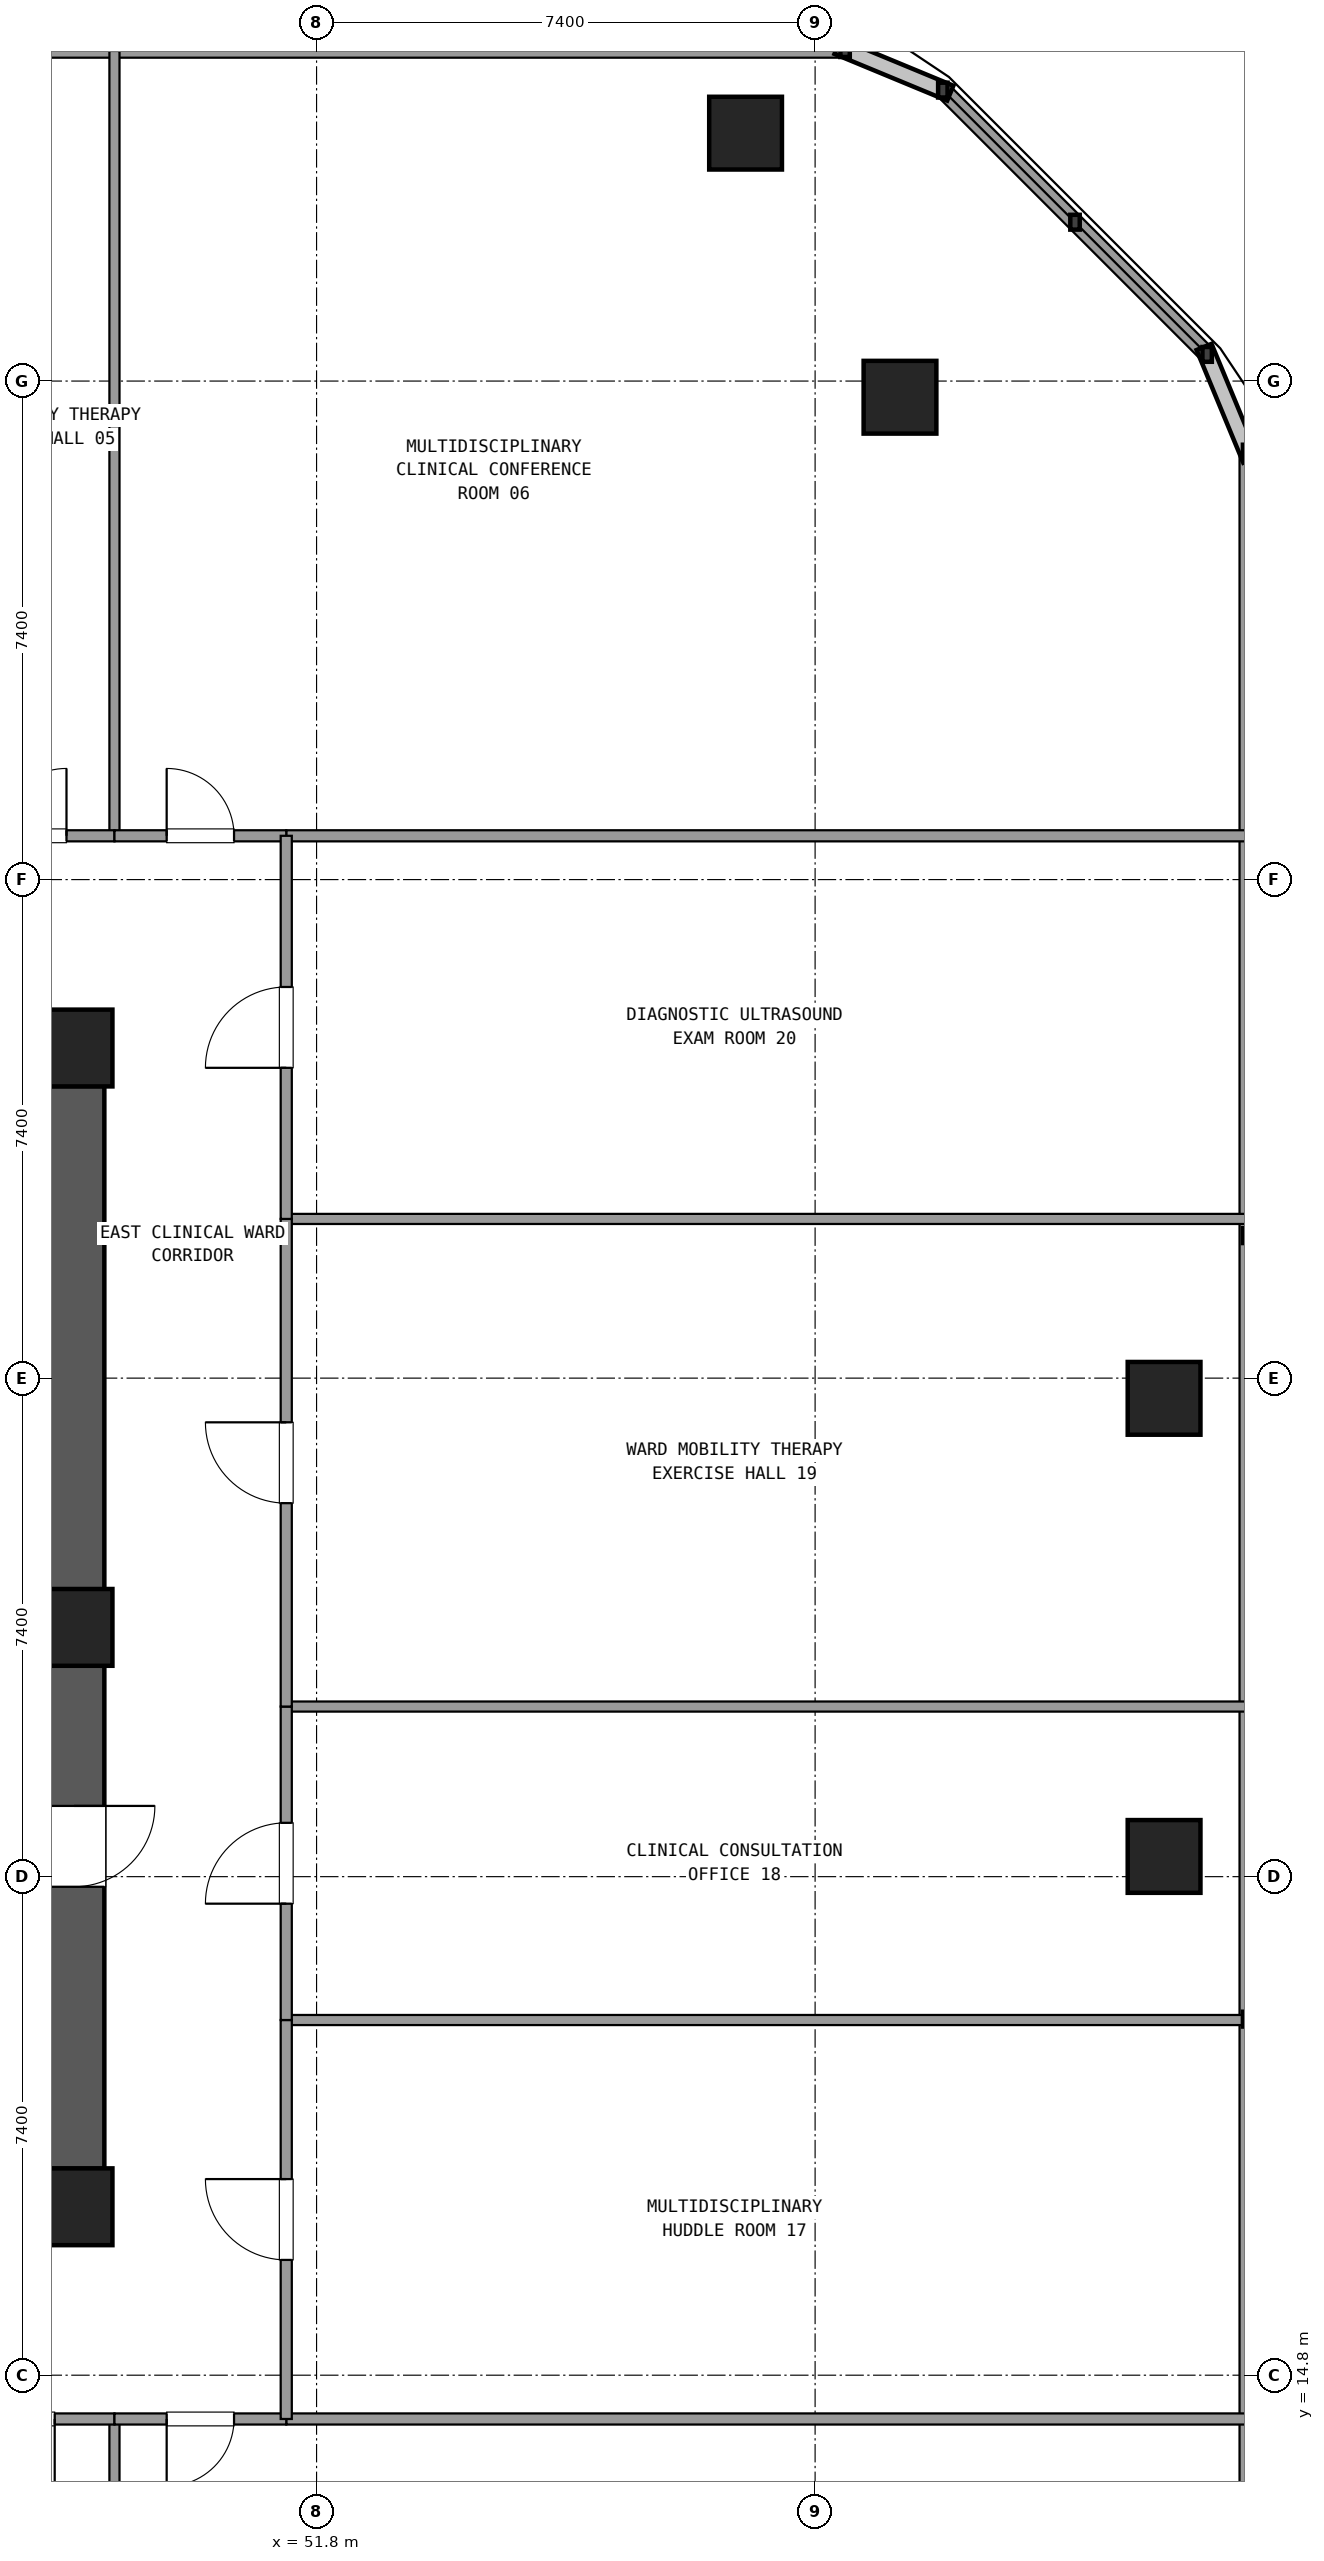
"""IFC4 building model, lengths in metres.
Left out: names, types, materials, properties, quantities, classifications, styles, units other than length and angle.
Written with IfcOpenShell. Run it as: python <this file> out.ifc"""

import sys

from ifc_helpers import new_model, si_unit, direction, frame, frame_2d, origin, origin_2d, place, context, subcontext, project, spatial, rectangle, extrude, element, fill, save


model = new_model("IFC4")
c1 = context("Model", 3, precision=1e-05, world=origin(), true_north=direction((0.0, 1.0)))
c2 = subcontext(c1, "Body", "Model", "MODEL_VIEW")
j1 = project(units=[si_unit("LENGTHUNIT", "METRE"), si_unit("PLANEANGLEUNIT", "RADIAN")], contexts=[c1])
p1 = place(None, origin())
s1 = spatial("IfcSite", under=j1, at=p1, CompositionType="ELEMENT")
p2 = place(p1, origin())
s2 = spatial("IfcBuilding", under=s1, at=p2, CompositionType="ELEMENT")
p3 = place(p2, frame((0.0, 0.0, 34.74)))
s3 = spatial("IfcBuildingStorey", under=s2, at=p3, CompositionType="ELEMENT", Elevation=34.74)
for number, where, z_axis, x_axis in (
    (1, (48.2, 17.3, 0.0), (0.0, 0.0, 1.0), (1.0, 0.0, 0.0)),
    (2, (48.2, 25.9, 0.0), (0.0, 0.0, 1.0), (1.0, 0.0, 0.0)),
    (3, (48.2, 34.5, 0.0), (0.0, 0.0, 1.0), (1.0, 0.0, 0.0)),
):
    element("IfcColumn", number, at=place(p3, frame(where, z_axis=z_axis, x_axis=x_axis)), inside=s3, PredefinedType="COLUMN", context=c2, shape_type="SweptSolid", body=[
        extrude(rectangle(XDim=1.14, YDim=1.14, at=origin_2d()), origin(), (0.0, 0.0, 1.0), 3.6),
    ])
p4 = place(p3, frame((48.2, 17.865, 0.0), z_axis=(0.0, 0.0, 1.0), x_axis=(0.0, 1.0, 0.0)))
e4 = element("IfcWall", 4, at=p4, inside=s3, PredefinedType="SHEAR", context=c2, shape_type="SweptSolid", body=[
    extrude(rectangle(XDim=7.47, YDim=0.9, at=frame_2d((3.735, 0.0))), origin(), (0.0, 0.0, 1.0), 3.32),
])
p5 = place(p4, frame((4.185, 0.0, 0.0)))
e5 = element("IfcOpeningElement", 5, at=p5, cuts=e4, PredefinedType="OPENING", context=c2, shape_type="SweptSolid", body=[
    extrude(rectangle(XDim=1.2, YDim=2.15, at=frame_2d((0.6, 1.075))), frame((0.0, 0.46, 0.0), z_axis=(0.0, -1.0, 0.0), x_axis=(1.0, 0.0, 0.0)), (0.0, 0.0, 1.0), 0.92),
])
p6 = place(p3, frame((48.2, 26.465, 0.0), z_axis=(0.0, 0.0, 1.0), x_axis=(0.0, 1.0, 0.0)))
e6 = element("IfcWall", 6, at=p6, inside=s3, PredefinedType="SHEAR", context=c2, shape_type="SweptSolid", body=[
    extrude(rectangle(XDim=7.47, YDim=0.9, at=frame_2d((3.735, 0.0))), origin(), (0.0, 0.0, 1.0), 3.32),
])
for number, where, z_axis, x_axis in (
    (7, (64.38, 22.5, 0.0), (0.0, 0.0, 1.0), (1.0, 0.0, 0.0)),
    (8, (64.38, 29.3, 0.0), (0.0, 0.0, 1.0), (1.0, 0.0, 0.0)),
    (9, (60.46, 44.16, 0.0), (0.0, 0.0, 1.0), (1.0, 0.0, 0.0)),
    (10, (58.168, 48.08, 0.0), (0.0, 0.0, 1.0), (1.0, 0.0, 0.0)),
):
    element("IfcColumn", number, at=place(p3, frame(where, z_axis=z_axis, x_axis=x_axis)), inside=s3, PredefinedType="COLUMN", context=c2, shape_type="SweptSolid", body=[
        extrude(rectangle(XDim=1.08, YDim=1.08, at=origin_2d()), origin(), (0.0, 0.0, 1.0), 3.6),
    ])
p7 = place(p3, frame((65.62, 8.455, 0.0), z_axis=(0.0, 0.0, 1.0), x_axis=(0.0, 1.0, 0.0)))
e11 = element("IfcWall", 11, at=p7, inside=s3, PredefinedType="SOLIDWALL", context=c2, shape_type="SweptSolid", body=[
    extrude(rectangle(XDim=34.89, YDim=0.24, at=frame_2d((17.445, 0.0))), origin(), (0.0, 0.0, 1.0), 0.85),
])
p8 = place(p3, frame((65.019, 44.796, 0.0), z_axis=(0.0, 0.0, 1.0), x_axis=(-0.707106781187, 0.707106781187, 0.0)))
e12 = element("IfcWall", 12, at=p8, inside=s3, PredefinedType="SOLIDWALL", context=c2, shape_type="SweptSolid", body=[
    extrude(rectangle(XDim=5.548, YDim=0.24, at=frame_2d((2.774, 0.0))), origin(), (0.0, 0.0, 1.0), 0.85),
])
p9 = place(p3, frame((59.645, 49.32, 0.0), z_axis=(0.0, 0.0, 1.0), x_axis=(-1.0, 0.0, 0.0)))
e13 = element("IfcWall", 13, at=p9, inside=s3, PredefinedType="SOLIDWALL", context=c2, shape_type="SweptSolid", body=[
    extrude(rectangle(XDim=45.29, YDim=0.24, at=frame_2d((22.645, 0.0))), origin(), (0.0, 0.0, 1.0), 0.85),
])
for number, where, z_axis, x_axis in (
    (14, (51.35, 37.65, 0.0), (0.0, 0.0, 1.0), (1.0, 0.0, 0.0)),
    (15, (51.35, 14.15, 0.0), (0.0, 0.0, 1.0), (1.0, 0.0, 0.0)),
):
    element("IfcWall", number, at=place(p3, frame(where, z_axis=z_axis, x_axis=x_axis)), inside=s3, PredefinedType="PARTITIONING", context=c2, shape_type="SweptSolid", body=[
        extrude(rectangle(XDim=14.25, YDim=0.165, at=frame_2d((7.125, 0.0))), origin(), (0.0, 0.0, 1.0), 2.61),
    ])
p10 = place(p3, frame((48.8, 37.65, 0.0), z_axis=(0.0, 0.0, 1.0), x_axis=(0.0, 1.0, 0.0)))
e16 = element("IfcWall", 16, at=p10, inside=s3, PredefinedType="PARTITIONING", context=c2, shape_type="SweptSolid", body=[
    extrude(rectangle(XDim=11.65, YDim=0.15, at=frame_2d((5.825, 0.0))), origin(), (0.0, 0.0, 1.0), 2.61),
])
p11 = place(p3, frame((46.377, 37.65, 0.0), z_axis=(0.0, 0.0, 1.0), x_axis=(1.0, 0.0, 0.0)))
e17 = element("IfcWall", 17, at=p11, inside=s3, PredefinedType="PARTITIONING", context=c2, shape_type="SweptSolid", body=[
    extrude(rectangle(XDim=2.423, YDim=0.165, at=frame_2d((1.211, 0.0))), origin(), (0.0, 0.0, 1.0), 2.61),
])
p12 = place(p11, frame((0.711, 0.0, 0.0)))
e18 = element("IfcOpeningElement", 18, at=p12, cuts=e17, PredefinedType="OPENING", context=c2, shape_type="SweptSolid", body=[
    extrude(rectangle(XDim=1.0, YDim=2.15, at=frame_2d((0.5, 1.075))), frame((0.0, 0.093, 0.0), z_axis=(0.0, -1.0, 0.0), x_axis=(1.0, 0.0, 0.0)), (0.0, 0.0, 1.0), 0.185),
])
p13 = place(p3, frame((48.8, 37.65, 0.0), z_axis=(0.0, 0.0, 1.0), x_axis=(1.0, 0.0, 0.0)))
e19 = element("IfcWall", 19, at=p13, inside=s3, PredefinedType="PARTITIONING", context=c2, shape_type="SweptSolid", body=[
    extrude(rectangle(XDim=2.55, YDim=0.165, at=frame_2d((1.275, 0.0))), origin(), (0.0, 0.0, 1.0), 2.61),
])
p14 = place(p13, frame((0.775, 0.0, 0.0)))
e20 = element("IfcOpeningElement", 20, at=p14, cuts=e19, PredefinedType="OPENING", context=c2, shape_type="SweptSolid", body=[
    extrude(rectangle(XDim=1.0, YDim=2.15, at=frame_2d((0.5, 1.075))), frame((0.0, 0.093, 0.0), z_axis=(0.0, -1.0, 0.0), x_axis=(1.0, 0.0, 0.0)), (0.0, 0.0, 1.0), 0.185),
])
p15 = place(p3, frame((48.8, 14.15, 0.0), z_axis=(0.0, 0.0, 1.0), x_axis=(0.0, -1.0, 0.0)))
e21 = element("IfcWall", 21, at=p15, inside=s3, PredefinedType="PARTITIONING", context=c2, shape_type="SweptSolid", body=[
    extrude(rectangle(XDim=11.65, YDim=0.15, at=frame_2d((5.825, 0.0))), origin(), (0.0, 0.0, 1.0), 2.61),
])
p16 = place(p3, frame((45.826, 14.15, 0.0), z_axis=(0.0, 0.0, 1.0), x_axis=(1.0, 0.0, 0.0)))
e22 = element("IfcWall", 22, at=p16, inside=s3, PredefinedType="PARTITIONING", context=c2, shape_type="SweptSolid", body=[
    extrude(rectangle(XDim=2.974, YDim=0.165, at=frame_2d((1.487, 0.0))), origin(), (0.0, 0.0, 1.0), 2.61),
])
p17 = place(p16, frame((0.887, 0.0, 0.0)))
e23 = element("IfcOpeningElement", 23, at=p17, cuts=e22, PredefinedType="OPENING", context=c2, shape_type="SweptSolid", body=[
    extrude(rectangle(XDim=1.2, YDim=2.15, at=frame_2d((0.6, 1.075))), frame((0.0, 0.093, 0.0), z_axis=(0.0, -1.0, 0.0), x_axis=(1.0, 0.0, 0.0)), (0.0, 0.0, 1.0), 0.185),
])
p18 = place(p3, frame((48.8, 14.15, 0.0), z_axis=(0.0, 0.0, 1.0), x_axis=(1.0, 0.0, 0.0)))
e24 = element("IfcWall", 24, at=p18, inside=s3, PredefinedType="PARTITIONING", context=c2, shape_type="SweptSolid", body=[
    extrude(rectangle(XDim=2.55, YDim=0.165, at=frame_2d((1.275, 0.0))), origin(), (0.0, 0.0, 1.0), 2.61),
])
p19 = place(p18, frame((0.775, 0.0, 0.0)))
e25 = element("IfcOpeningElement", 25, at=p19, cuts=e24, PredefinedType="OPENING", context=c2, shape_type="SweptSolid", body=[
    extrude(rectangle(XDim=1.0, YDim=2.15, at=frame_2d((0.5, 1.075))), frame((0.0, 0.093, 0.0), z_axis=(0.0, -1.0, 0.0), x_axis=(1.0, 0.0, 0.0)), (0.0, 0.0, 1.0), 0.185),
])
p20 = place(p3, frame((51.35, 20.072, 0.0), z_axis=(0.0, 0.0, 1.0), x_axis=(1.0, 0.0, 0.0)))
e26 = element("IfcWall", 26, at=p20, inside=s3, PredefinedType="PARTITIONING", context=c2, shape_type="SweptSolid", body=[
    extrude(rectangle(XDim=14.25, YDim=0.15, at=frame_2d((7.125, 0.0))), origin(), (0.0, 0.0, 1.0), 2.61),
])
p21 = place(p3, frame((51.35, 14.15, 0.0), z_axis=(0.0, 0.0, 1.0), x_axis=(0.0, 1.0, 0.0)))
e27 = element("IfcWall", 27, at=p21, inside=s3, PredefinedType="PARTITIONING", context=c2, shape_type="SweptSolid", body=[
    extrude(rectangle(XDim=5.922, YDim=0.165, at=frame_2d((2.961, 0.0))), origin(), (0.0, 0.0, 1.0), 2.61),
])
p22 = place(p21, frame((2.361, 0.0, 0.0)))
e28 = element("IfcOpeningElement", 28, at=p22, cuts=e27, PredefinedType="OPENING", context=c2, shape_type="SweptSolid", body=[
    extrude(rectangle(XDim=1.2, YDim=2.15, at=frame_2d((0.6, 1.075))), frame((0.0, 0.093, 0.0), z_axis=(0.0, -1.0, 0.0), x_axis=(1.0, 0.0, 0.0)), (0.0, 0.0, 1.0), 0.185),
])
p23 = place(p3, frame((51.35, 24.725, 0.0), z_axis=(0.0, 0.0, 1.0), x_axis=(1.0, 0.0, 0.0)))
e29 = element("IfcWall", 29, at=p23, inside=s3, PredefinedType="PARTITIONING", context=c2, shape_type="SweptSolid", body=[
    extrude(rectangle(XDim=14.25, YDim=0.15, at=frame_2d((7.125, 0.0))), origin(), (0.0, 0.0, 1.0), 2.61),
])
p24 = place(p3, frame((51.35, 20.072, 0.0), z_axis=(0.0, 0.0, 1.0), x_axis=(0.0, 1.0, 0.0)))
e30 = element("IfcWall", 30, at=p24, inside=s3, PredefinedType="PARTITIONING", context=c2, shape_type="SweptSolid", body=[
    extrude(rectangle(XDim=4.653, YDim=0.165, at=frame_2d((2.327, 0.0))), origin(), (0.0, 0.0, 1.0), 2.61),
])
p25 = place(p24, frame((1.727, 0.0, 0.0)))
e31 = element("IfcOpeningElement", 31, at=p25, cuts=e30, PredefinedType="OPENING", context=c2, shape_type="SweptSolid", body=[
    extrude(rectangle(XDim=1.2, YDim=2.15, at=frame_2d((0.6, 1.075))), frame((0.0, 0.093, 0.0), z_axis=(0.0, -1.0, 0.0), x_axis=(1.0, 0.0, 0.0)), (0.0, 0.0, 1.0), 0.185),
])
p26 = place(p3, frame((51.35, 31.963, 0.0), z_axis=(0.0, 0.0, 1.0), x_axis=(1.0, 0.0, 0.0)))
e32 = element("IfcWall", 32, at=p26, inside=s3, PredefinedType="PARTITIONING", context=c2, shape_type="SweptSolid", body=[
    extrude(rectangle(XDim=14.25, YDim=0.15, at=frame_2d((7.125, 0.0))), origin(), (0.0, 0.0, 1.0), 2.61),
])
p27 = place(p3, frame((51.35, 24.725, 0.0), z_axis=(0.0, 0.0, 1.0), x_axis=(0.0, 1.0, 0.0)))
e33 = element("IfcWall", 33, at=p27, inside=s3, PredefinedType="PARTITIONING", context=c2, shape_type="SweptSolid", body=[
    extrude(rectangle(XDim=7.238, YDim=0.165, at=frame_2d((3.619, 0.0))), origin(), (0.0, 0.0, 1.0), 2.61),
])
p28 = place(p27, frame((3.019, 0.0, 0.0)))
e34 = element("IfcOpeningElement", 34, at=p28, cuts=e33, PredefinedType="OPENING", context=c2, shape_type="SweptSolid", body=[
    extrude(rectangle(XDim=1.2, YDim=2.15, at=frame_2d((0.6, 1.075))), frame((0.0, 0.093, 0.0), z_axis=(0.0, -1.0, 0.0), x_axis=(1.0, 0.0, 0.0)), (0.0, 0.0, 1.0), 0.185),
])
p29 = place(p3, frame((51.35, 31.963, 0.0), z_axis=(0.0, 0.0, 1.0), x_axis=(0.0, 1.0, 0.0)))
e35 = element("IfcWall", 35, at=p29, inside=s3, PredefinedType="PARTITIONING", context=c2, shape_type="SweptSolid", body=[
    extrude(rectangle(XDim=5.687, YDim=0.165, at=frame_2d((2.844, 0.0))), origin(), (0.0, 0.0, 1.0), 2.61),
])
p30 = place(p29, frame((2.243, 0.0, 0.0)))
e36 = element("IfcOpeningElement", 36, at=p30, cuts=e35, PredefinedType="OPENING", context=c2, shape_type="SweptSolid", body=[
    extrude(rectangle(XDim=1.2, YDim=2.15, at=frame_2d((0.6, 1.075))), frame((0.0, 0.093, 0.0), z_axis=(0.0, -1.0, 0.0), x_axis=(1.0, 0.0, 0.0)), (0.0, 0.0, 1.0), 0.185),
])
p31 = place(p5, frame((1.2, 0.0, 0.0), z_axis=(0.0, 0.0, 1.0), x_axis=(-1.0, 0.0, 0.0)))
e37 = element("IfcDoor", 37, at=p31, inside=s3, OperationType="SINGLE_SWING_RIGHT", PredefinedType="DOOR", context=c2, shape_type="SweptSolid", body=[
    extrude(rectangle(XDim=1.2, YDim=2.15, at=frame_2d((0.6, 1.075))), frame((0.0, 0.025, 0.0), z_axis=(0.0, -1.0, 0.0), x_axis=(1.0, 0.0, 0.0)), (0.0, 0.0, 1.0), 0.05),
])
fill(e5, e37)
p32 = place(p12, origin())
e38 = element("IfcDoor", 38, at=p32, inside=s3, OperationType="SINGLE_SWING_RIGHT", PredefinedType="DOOR", context=c2, shape_type="SweptSolid", body=[
    extrude(rectangle(XDim=1.0, YDim=2.15, at=frame_2d((0.5, 1.075))), frame((0.0, 0.025, 0.0), z_axis=(0.0, -1.0, 0.0), x_axis=(1.0, 0.0, 0.0)), (0.0, 0.0, 1.0), 0.05),
])
fill(e18, e38)
p33 = place(p14, origin())
e39 = element("IfcDoor", 39, at=p33, inside=s3, OperationType="SINGLE_SWING_LEFT", PredefinedType="DOOR", context=c2, shape_type="SweptSolid", body=[
    extrude(rectangle(XDim=1.0, YDim=2.15, at=frame_2d((0.5, 1.075))), frame((0.0, 0.025, 0.0), z_axis=(0.0, -1.0, 0.0), x_axis=(1.0, 0.0, 0.0)), (0.0, 0.0, 1.0), 0.05),
])
fill(e20, e39)
p34 = place(p17, frame((1.2, 0.0, 0.0), z_axis=(0.0, 0.0, 1.0), x_axis=(-1.0, 0.0, 0.0)))
e40 = element("IfcDoor", 40, at=p34, inside=s3, OperationType="SINGLE_SWING_RIGHT", PredefinedType="DOOR", context=c2, shape_type="SweptSolid", body=[
    extrude(rectangle(XDim=1.2, YDim=2.15, at=frame_2d((0.6, 1.075))), frame((0.0, 0.025, 0.0), z_axis=(0.0, -1.0, 0.0), x_axis=(1.0, 0.0, 0.0)), (0.0, 0.0, 1.0), 0.05),
])
fill(e23, e40)
p35 = place(p19, frame((1.0, 0.0, 0.0), z_axis=(0.0, 0.0, 1.0), x_axis=(-1.0, 0.0, 0.0)))
e41 = element("IfcDoor", 41, at=p35, inside=s3, OperationType="SINGLE_SWING_LEFT", PredefinedType="DOOR", context=c2, shape_type="SweptSolid", body=[
    extrude(rectangle(XDim=1.0, YDim=2.15, at=frame_2d((0.5, 1.075))), frame((0.0, 0.025, 0.0), z_axis=(0.0, -1.0, 0.0), x_axis=(1.0, 0.0, 0.0)), (0.0, 0.0, 1.0), 0.05),
])
fill(e25, e41)
p36 = place(p22, origin())
e42 = element("IfcDoor", 42, at=p36, inside=s3, OperationType="SINGLE_SWING_RIGHT", PredefinedType="DOOR", context=c2, shape_type="SweptSolid", body=[
    extrude(rectangle(XDim=1.2, YDim=2.15, at=frame_2d((0.6, 1.075))), frame((0.0, 0.025, 0.0), z_axis=(0.0, -1.0, 0.0), x_axis=(1.0, 0.0, 0.0)), (0.0, 0.0, 1.0), 0.05),
])
fill(e28, e42)
p37 = place(p25, origin())
e43 = element("IfcDoor", 43, at=p37, inside=s3, OperationType="SINGLE_SWING_LEFT", PredefinedType="DOOR", context=c2, shape_type="SweptSolid", body=[
    extrude(rectangle(XDim=1.2, YDim=2.15, at=frame_2d((0.6, 1.075))), frame((0.0, 0.025, 0.0), z_axis=(0.0, -1.0, 0.0), x_axis=(1.0, 0.0, 0.0)), (0.0, 0.0, 1.0), 0.05),
])
fill(e31, e43)
p38 = place(p28, origin())
e44 = element("IfcDoor", 44, at=p38, inside=s3, OperationType="SINGLE_SWING_RIGHT", PredefinedType="DOOR", context=c2, shape_type="SweptSolid", body=[
    extrude(rectangle(XDim=1.2, YDim=2.15, at=frame_2d((0.6, 1.075))), frame((0.0, 0.025, 0.0), z_axis=(0.0, -1.0, 0.0), x_axis=(1.0, 0.0, 0.0)), (0.0, 0.0, 1.0), 0.05),
])
fill(e34, e44)
p39 = place(p30, origin())
e45 = element("IfcDoor", 45, at=p39, inside=s3, OperationType="SINGLE_SWING_LEFT", PredefinedType="DOOR", context=c2, shape_type="SweptSolid", body=[
    extrude(rectangle(XDim=1.2, YDim=2.15, at=frame_2d((0.6, 1.075))), frame((0.0, 0.025, 0.0), z_axis=(0.0, -1.0, 0.0), x_axis=(1.0, 0.0, 0.0)), (0.0, 0.0, 1.0), 0.05),
])
fill(e36, e45)
save(model, sys.argv[1])
